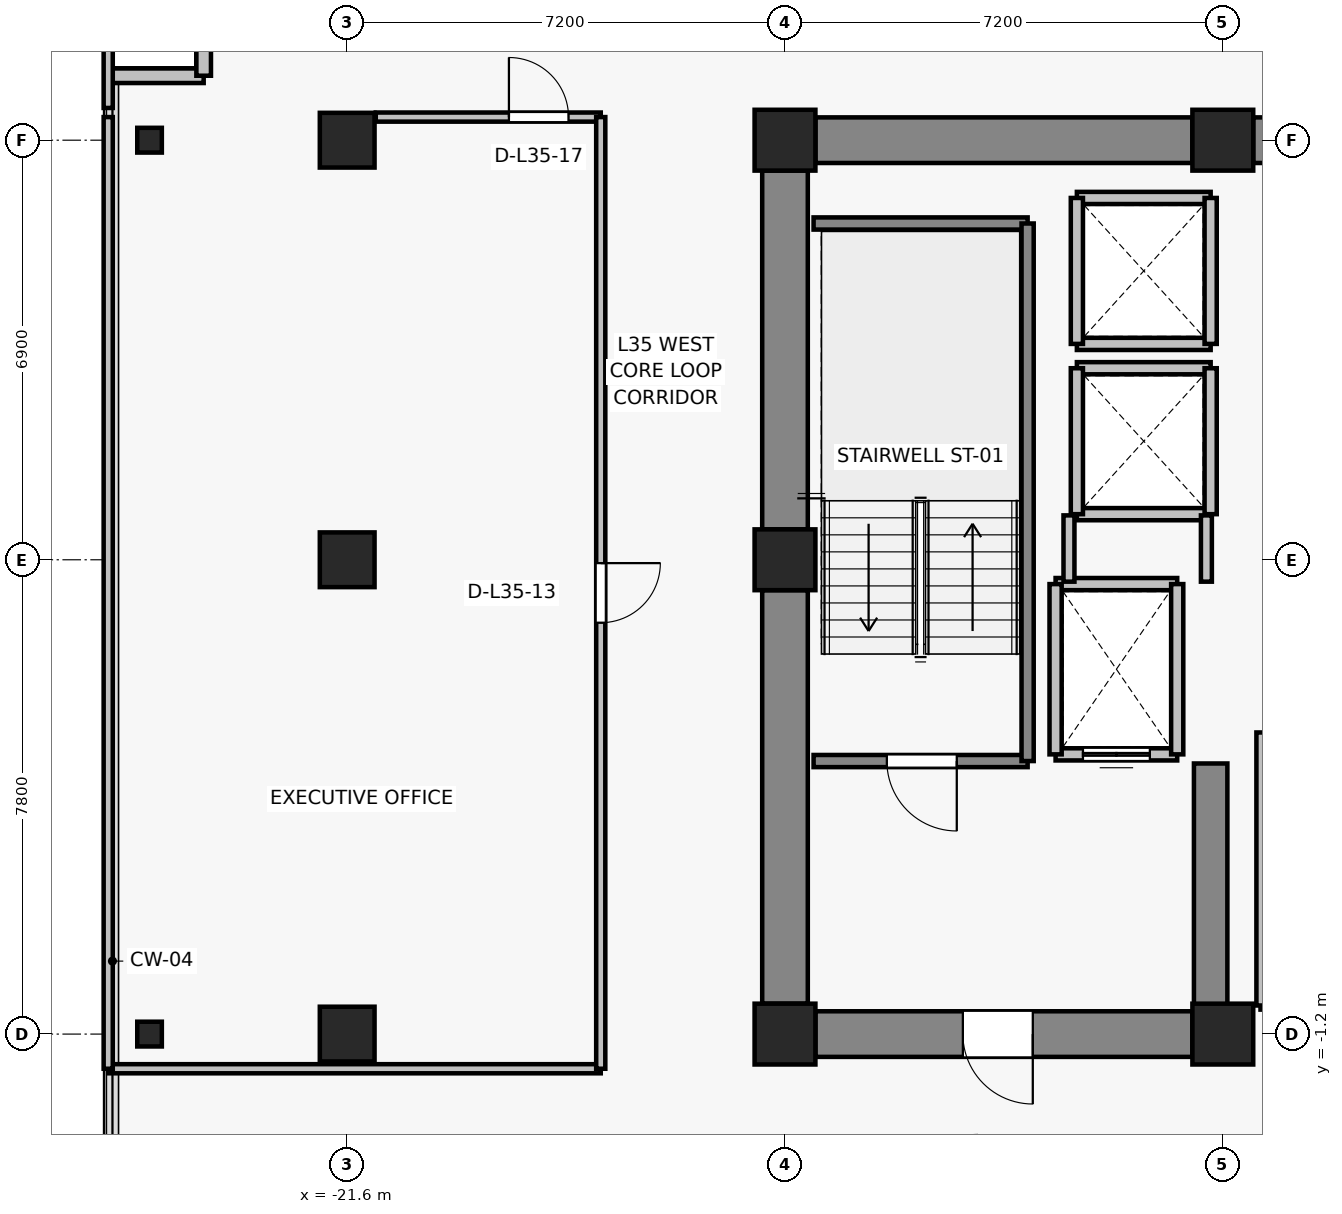
"""IFC4 building model, lengths in metres.
Left out: names, types, materials, properties, quantities, classifications, styles, units other than length and angle.
Written with IfcOpenShell. Run it as: python <this file> out.ifc"""

import sys

from ifc_helpers import new_model, si_unit, direction, frame, frame_2d, origin, origin_2d, place, context, subcontext, project, spatial, rectangle, i_section, extrude, source, transform, mapped, element, fill, save


model = new_model("IFC4")
c1 = context("Model", 3, precision=1e-05, world=origin(), true_north=direction((0.0, 1.0)))
c2 = subcontext(c1, "Body", "Model", "MODEL_VIEW")
j1 = project(units=[si_unit("LENGTHUNIT", "METRE"), si_unit("PLANEANGLEUNIT", "RADIAN")], contexts=[c1])
p1 = place(None, origin())
s1 = spatial("IfcSite", under=j1, at=p1, CompositionType="ELEMENT")
p2 = place(p1, origin())
s2 = spatial("IfcBuilding", under=s1, at=p2, CompositionType="ELEMENT")
p3 = place(p2, frame((0.0, 0.0, 126.4)))
s3 = spatial("IfcBuildingStorey", under=s2, at=p3, CompositionType="ELEMENT", Elevation=126.4)
for number, where, z_axis, x_axis in (
    (1, (-14.4, -1.2, 0.0), (0.0, 0.0, 1.0), (1.0, 0.0, 0.0)),
    (2, (-7.2, -1.2, 0.0), (0.0, 0.0, 1.0), (1.0, 0.0, 0.0)),
    (3, (-14.4, 6.6, 0.0), (0.0, 0.0, 1.0), (1.0, 0.0, 0.0)),
    (4, (-14.4, 13.5, 0.0), (0.0, 0.0, 1.0), (1.0, 0.0, 0.0)),
    (5, (-7.2, 13.5, 0.0), (0.0, 0.0, 1.0), (1.0, 0.0, 0.0)),
):
    element("IfcColumn", number, at=place(p3, frame(where, z_axis=z_axis, x_axis=x_axis)), inside=s3, PredefinedType="COLUMN", context=c2, shape_type="SweptSolid", body=[
        extrude(rectangle(XDim=1.0, YDim=1.0, at=origin_2d()), origin(), (0.0, 0.0, 1.0), 3.3),
    ])
for number, where, z_axis, x_axis in (
    (6, (-21.6, -1.2, 0.0), (0.0, 0.0, 1.0), (1.0, 0.0, 0.0)),
    (7, (-21.6, 6.6, 0.0), (0.0, 0.0, 1.0), (1.0, 0.0, 0.0)),
    (8, (-21.6, 13.5, 0.0), (0.0, 0.0, 1.0), (1.0, 0.0, 0.0)),
):
    element("IfcColumn", number, at=place(p3, frame(where, z_axis=z_axis, x_axis=x_axis)), inside=s3, PredefinedType="COLUMN", context=c2, shape_type="SweptSolid", body=[
        extrude(rectangle(XDim=0.9, YDim=0.9, at=origin_2d()), origin(), (0.0, 0.0, 1.0), 3.3),
    ])
for number, where, z_axis, x_axis in (
    (9, (-24.85, -1.2, 0.0), (0.0, 0.0, 1.0), (1.0, 0.0, 0.0)),
    (10, (-24.85, 13.5, 0.0), (0.0, 0.0, 1.0), (1.0, 0.0, 0.0)),
):
    element("IfcColumn", number, at=place(p3, frame(where, z_axis=z_axis, x_axis=x_axis)), inside=s3, PredefinedType="COLUMN", context=c2, shape_type="SweptSolid", body=[
        extrude(i_section(OverallWidth=0.404, OverallDepth=0.407, WebThickness=0.022, FlangeThickness=0.032, FilletRadius=0.015, at=origin_2d()), origin(), (0.0, 0.0, 1.0), 3.3),
    ])
p4 = place(p3, frame((-13.9, 13.5, 0.0), z_axis=(0.0, 0.0, 1.0), x_axis=(1.0, 0.0, 0.0)))
e11 = element("IfcWall", 11, at=p4, inside=s3, PredefinedType="SHEAR", context=c2, shape_type="SweptSolid", body=[
    extrude(rectangle(XDim=6.2, YDim=0.75, at=frame_2d((3.1, 0.0))), origin(), (0.0, 0.0, 1.0), 3.075),
])
p5 = place(p3, frame((-6.7, 13.5, 0.0), z_axis=(0.0, 0.0, 1.0), x_axis=(1.0, 0.0, 0.0)))
e12 = element("IfcWall", 12, at=p5, inside=s3, PredefinedType="SHEAR", context=c2, shape_type="SweptSolid", body=[
    extrude(rectangle(XDim=13.4, YDim=0.75, at=frame_2d((6.7, 0.0))), origin(), (0.0, 0.0, 1.0), 3.075),
])
p6 = place(p3, frame((-14.4, -0.7, 0.0), z_axis=(0.0, 0.0, 1.0), x_axis=(0.0, 1.0, 0.0)))
e13 = element("IfcWall", 13, at=p6, inside=s3, PredefinedType="SHEAR", context=c2, shape_type="SweptSolid", body=[
    extrude(rectangle(XDim=6.8, YDim=0.75, at=frame_2d((3.4, 0.0))), origin(), (0.0, 0.0, 1.0), 3.075),
])
p7 = place(p3, frame((-14.4, 7.1, 0.0), z_axis=(0.0, 0.0, 1.0), x_axis=(0.0, 1.0, 0.0)))
e14 = element("IfcWall", 14, at=p7, inside=s3, PredefinedType="SHEAR", context=c2, shape_type="SweptSolid", body=[
    extrude(rectangle(XDim=5.9, YDim=0.75, at=frame_2d((2.95, 0.0))), origin(), (0.0, 0.0, 1.0), 3.075),
])
p8 = place(p3, frame((-7.7, -1.2, 0.0), z_axis=(0.0, 0.0, 1.0), x_axis=(-1.0, 0.0, 0.0)))
e15 = element("IfcWall", 15, at=p8, inside=s3, PredefinedType="SHEAR", context=c2, shape_type="SweptSolid", body=[
    extrude(rectangle(XDim=6.2, YDim=0.75, at=frame_2d((3.1, 0.0))), origin(), (0.0, 0.0, 1.0), 3.075),
])
p9 = place(p8, frame((2.625, 0.0, 0.0)))
e16 = element("IfcOpeningElement", 16, at=p9, cuts=e15, PredefinedType="OPENING", context=c2, shape_type="SweptSolid", body=[
    extrude(rectangle(XDim=1.15, YDim=2.15, at=frame_2d((0.575, 1.075))), frame((0.0, 0.385, 0.0), z_axis=(0.0, -1.0, 0.0), x_axis=(1.0, 0.0, 0.0)), (0.0, 0.0, 1.0), 0.77),
])
p10 = place(p3, frame((-7.4, -0.825, 0.0), z_axis=(0.0, 0.0, 1.0), x_axis=(0.0, 1.0, 0.0)))
e17 = element("IfcWall", 17, at=p10, inside=s3, PredefinedType="SHEAR", context=c2, shape_type="SweptSolid", body=[
    extrude(rectangle(XDim=4.075, YDim=0.55, at=frame_2d((2.038, 0.0))), origin(), (0.0, 0.0, 1.0), 3.075),
])
for number, where, z_axis, x_axis in (
    (18, (-23.96, 14.56, 0.0), (0.0, 0.0, 1.0), (-1.0, 0.0, 0.0)),
    (19, (-23.96, 16.06, 0.0), (0.0, 0.0, 1.0), (0.0, -1.0, 0.0)),
):
    element("IfcWall", number, at=place(p3, frame(where, z_axis=z_axis, x_axis=x_axis)), inside=s3, PredefinedType="SOLIDWALL", context=c2, shape_type="SweptSolid", body=[
        extrude(rectangle(XDim=1.5, YDim=0.24, at=frame_2d((0.75, 0.0))), origin(), (0.0, 0.0, 1.0), 3.075),
    ])
p11 = place(p3, frame((-7.95, 3.4, 0.0), z_axis=(0.0, 0.0, 1.0), x_axis=(-1.0, 0.0, 0.0)))
e20 = element("IfcWall", 20, at=p11, inside=s3, PredefinedType="SOLIDWALL", context=c2, shape_type="SweptSolid", body=[
    extrude(rectangle(XDim=2.0, YDim=0.2, at=frame_2d((1.0, 0.0))), origin(), (0.0, 0.0, 1.0), 3.075),
])
p12 = place(p11, frame((0.45, 0.0, 0.0)))
e21 = element("IfcOpeningElement", 21, at=p12, cuts=e20, PredefinedType="OPENING", context=c2, shape_type="SweptSolid", body=[
    extrude(rectangle(XDim=1.1, YDim=2.2, at=frame_2d((0.55, 1.1))), frame((0.0, 0.11, 0.0), z_axis=(0.0, -1.0, 0.0), x_axis=(1.0, 0.0, 0.0)), (0.0, 0.0, 1.0), 0.22),
])
p13 = place(p3, frame((-9.95, 6.2, 0.0), z_axis=(0.0, 0.0, 1.0), x_axis=(1.0, 0.0, 0.0)))
e22 = element("IfcWall", 22, at=p13, inside=s3, PredefinedType="SOLIDWALL", context=c2, shape_type="SweptSolid", body=[
    extrude(rectangle(XDim=2.0, YDim=0.2, at=frame_2d((1.0, 0.0))), origin(), (0.0, 0.0, 1.0), 3.075),
])
for number, where, z_axis, x_axis in (
    (23, (-9.95, 3.4, 0.0), (0.0, 0.0, 1.0), (0.0, 1.0, 0.0)),
    (24, (-7.95, 6.2, 0.0), (0.0, 0.0, 1.0), (0.0, -1.0, 0.0)),
):
    element("IfcWall", number, at=place(p3, frame(where, z_axis=z_axis, x_axis=x_axis)), inside=s3, PredefinedType="SOLIDWALL", context=c2, shape_type="SweptSolid", body=[
        extrude(rectangle(XDim=2.8, YDim=0.2, at=frame_2d((1.4, 0.0))), origin(), (0.0, 0.0, 1.0), 3.075),
    ])
for number, where, z_axis, x_axis in (
    (25, (-7.4, 7.35, 0.0), (0.0, 0.0, 1.0), (-1.0, 0.0, 0.0)),
    (26, (-9.6, 9.75, 0.0), (0.0, 0.0, 1.0), (1.0, 0.0, 0.0)),
):
    element("IfcWall", number, at=place(p3, frame(where, z_axis=z_axis, x_axis=x_axis)), inside=s3, PredefinedType="SOLIDWALL", context=c2, shape_type="SweptSolid", body=[
        extrude(rectangle(XDim=2.2, YDim=0.2, at=frame_2d((1.1, 0.0))), origin(), (0.0, 0.0, 1.0), 2.515),
    ])
p14 = place(p3, frame((-9.6, 7.35, 0.0), z_axis=(0.0, 0.0, 1.0), x_axis=(0.0, 1.0, 0.0)))
e27 = element("IfcWall", 27, at=p14, inside=s3, PredefinedType="SOLIDWALL", context=c2, shape_type="SweptSolid", body=[
    extrude(rectangle(XDim=2.4, YDim=0.2, at=frame_2d((1.2, 0.0))), origin(), (0.0, 0.0, 1.0), 3.075),
])
p15 = place(p3, frame((-7.4, 9.75, 0.0), z_axis=(0.0, 0.0, 1.0), x_axis=(0.0, -1.0, 0.0)))
e28 = element("IfcWall", 28, at=p15, inside=s3, PredefinedType="SOLIDWALL", context=c2, shape_type="SweptSolid", body=[
    extrude(rectangle(XDim=2.4, YDim=0.2, at=frame_2d((1.2, 0.0))), origin(), (0.0, 0.0, 1.0), 2.515),
])
for number, where, z_axis, x_axis in (
    (29, (-7.4, 10.15, 0.0), (0.0, 0.0, 1.0), (-1.0, 0.0, 0.0)),
    (30, (-9.6, 12.55, 0.0), (0.0, 0.0, 1.0), (1.0, 0.0, 0.0)),
):
    element("IfcWall", number, at=place(p3, frame(where, z_axis=z_axis, x_axis=x_axis)), inside=s3, PredefinedType="SOLIDWALL", context=c2, shape_type="SweptSolid", body=[
        extrude(rectangle(XDim=2.2, YDim=0.2, at=frame_2d((1.1, 0.0))), origin(), (0.0, 0.0, 1.0), 2.515),
    ])
p16 = place(p3, frame((-9.6, 10.15, 0.0), z_axis=(0.0, 0.0, 1.0), x_axis=(0.0, 1.0, 0.0)))
e31 = element("IfcWall", 31, at=p16, inside=s3, PredefinedType="SOLIDWALL", context=c2, shape_type="SweptSolid", body=[
    extrude(rectangle(XDim=2.4, YDim=0.2, at=frame_2d((1.2, 0.0))), origin(), (0.0, 0.0, 1.0), 3.075),
])
p17 = place(p3, frame((-7.4, 12.55, 0.0), z_axis=(0.0, 0.0, 1.0), x_axis=(0.0, -1.0, 0.0)))
e32 = element("IfcWall", 32, at=p17, inside=s3, PredefinedType="SOLIDWALL", context=c2, shape_type="SweptSolid", body=[
    extrude(rectangle(XDim=2.4, YDim=0.2, at=frame_2d((1.2, 0.0))), origin(), (0.0, 0.0, 1.0), 2.515),
])
p18 = place(p3, frame((-10.41, 3.29, 0.0), z_axis=(0.0, 0.0, 1.0), x_axis=(-1.0, 0.0, 0.0)))
e33 = element("IfcWall", 33, at=p18, inside=s3, PredefinedType="SOLIDWALL", context=c2, shape_type="SweptSolid", body=[
    extrude(rectangle(XDim=3.52, YDim=0.2, at=frame_2d((1.76, 0.0))), origin(), (0.0, 0.0, 1.0), 3.075),
])
p19 = place(p18, frame((1.165, 0.0, 0.0)))
e34 = element("IfcOpeningElement", 34, at=p19, cuts=e33, PredefinedType="OPENING", context=c2, shape_type="SweptSolid", body=[
    extrude(rectangle(XDim=1.15, YDim=2.15, at=frame_2d((0.575, 1.075))), frame((0.0, 0.11, 0.0), z_axis=(0.0, -1.0, 0.0), x_axis=(1.0, 0.0, 0.0)), (0.0, 0.0, 1.0), 0.22),
])
p20 = place(p3, frame((-13.93, 12.13, 0.0), z_axis=(0.0, 0.0, 1.0), x_axis=(1.0, 0.0, 0.0)))
e35 = element("IfcWall", 35, at=p20, inside=s3, PredefinedType="SOLIDWALL", context=c2, shape_type="SweptSolid", body=[
    extrude(rectangle(XDim=3.52, YDim=0.2, at=frame_2d((1.76, 0.0))), origin(), (0.0, 0.0, 1.0), 3.075),
])
p21 = place(p3, frame((-10.41, 12.13, 0.0), z_axis=(0.0, 0.0, 1.0), x_axis=(0.0, -1.0, 0.0)))
e36 = element("IfcWall", 36, at=p21, inside=s3, PredefinedType="SOLIDWALL", context=c2, shape_type="SweptSolid", body=[
    extrude(rectangle(XDim=8.84, YDim=0.2, at=frame_2d((4.42, 0.0))), origin(), (0.0, 0.0, 1.0), 3.075),
])
p22 = place(p3, frame((-9.73, 6.24, 0.0), z_axis=(0.0, 0.0, 1.0), x_axis=(0.0, 1.0, 0.0)))
e37 = element("IfcWall", 37, at=p22, inside=s3, PredefinedType="PARTITIONING", context=c2, shape_type="SweptSolid", body=[
    extrude(rectangle(XDim=1.09, YDim=0.18, at=frame_2d((0.545, 0.0))), origin(), (0.0, 0.0, 1.0), 3.075),
])
p23 = place(p3, frame((-7.47, 7.33, 0.0), z_axis=(0.0, 0.0, 1.0), x_axis=(0.0, -1.0, 0.0)))
e38 = element("IfcWall", 38, at=p23, inside=s3, PredefinedType="PARTITIONING", context=c2, shape_type="SweptSolid", body=[
    extrude(rectangle(XDim=1.09, YDim=0.18, at=frame_2d((0.545, 0.0))), origin(), (0.0, 0.0, 1.0), 2.515),
])
p24 = place(p3, frame((-1.47, -0.73, 0.0), z_axis=(0.0, 0.0, 1.0), x_axis=(-1.0, 0.0, 0.0)))
e39 = element("IfcWall", 39, at=p24, inside=s3, PredefinedType="PARTITIONING", context=c2, shape_type="SweptSolid", body=[
    extrude(rectangle(XDim=5.11, YDim=0.135, at=frame_2d((2.555, 0.0))), origin(), (0.0, 0.0, 1.0), 3.075),
])
p25 = place(p3, frame((-6.58, -0.73, 0.0), z_axis=(0.0, 0.0, 1.0), x_axis=(0.0, 1.0, 0.0)))
e40 = element("IfcWall", 40, at=p25, inside=s3, PredefinedType="PARTITIONING", context=c2, shape_type="SweptSolid", body=[
    extrude(rectangle(XDim=4.49, YDim=0.135, at=frame_2d((2.245, 0.0))), origin(), (0.0, 0.0, 1.0), 3.075),
])
p26 = place(p3, frame((-17.43, -1.77, 0.0), z_axis=(0.0, 0.0, 1.0), x_axis=(-1.0, 0.0, 0.0)))
e41 = element("IfcWall", 41, at=p26, inside=s3, PredefinedType="PARTITIONING", context=c2, shape_type="SweptSolid", body=[
    extrude(rectangle(XDim=8.1, YDim=0.15, at=frame_2d((4.05, 0.0))), origin(), (0.0, 0.0, 1.0), 2.515),
])
p27 = place(p3, frame((-21.13, 13.88, 0.0), z_axis=(0.0, 0.0, 1.0), x_axis=(1.0, 0.0, 0.0)))
e42 = element("IfcWall", 42, at=p27, inside=s3, PredefinedType="PARTITIONING", context=c2, shape_type="SweptSolid", body=[
    extrude(rectangle(XDim=3.7, YDim=0.15, at=frame_2d((1.85, 0.0))), origin(), (0.0, 0.0, 1.0), 3.075),
])
p28 = place(p27, frame((2.19, 0.0, 0.0)))
e43 = element("IfcOpeningElement", 43, at=p28, cuts=e42, PredefinedType="OPENING", context=c2, shape_type="SweptSolid", body=[
    extrude(rectangle(XDim=0.98, YDim=2.15, at=frame_2d((0.49, 1.075))), frame((0.0, 0.085, 0.0), z_axis=(0.0, -1.0, 0.0), x_axis=(1.0, 0.0, 0.0)), (0.0, 0.0, 1.0), 0.17),
])
p29 = place(p3, frame((-25.53, -1.77, 0.0), z_axis=(0.0, 0.0, 1.0), x_axis=(0.0, 1.0, 0.0)))
e44 = element("IfcWall", 44, at=p29, inside=s3, PredefinedType="PARTITIONING", context=c2, shape_type="SweptSolid", body=[
    extrude(rectangle(XDim=15.65, YDim=0.15, at=frame_2d((7.825, 0.0))), origin(), (0.0, 0.0, 1.0), 3.075),
])
p30 = place(p3, frame((-17.43, 13.88, 0.0), z_axis=(0.0, 0.0, 1.0), x_axis=(0.0, -1.0, 0.0)))
e45 = element("IfcWall", 45, at=p30, inside=s3, PredefinedType="PARTITIONING", context=c2, shape_type="SweptSolid", body=[
    extrude(rectangle(XDim=15.65, YDim=0.15, at=frame_2d((7.825, 0.0))), origin(), (0.0, 0.0, 1.0), 2.515),
])
p31 = place(p30, frame((7.335, 0.0, 0.0)))
e46 = element("IfcOpeningElement", 46, at=p31, cuts=e45, PredefinedType="OPENING", context=c2, shape_type="SweptSolid", body=[
    extrude(rectangle(XDim=0.98, YDim=2.15, at=frame_2d((0.49, 1.075))), frame((0.0, 0.085, 0.0), z_axis=(0.0, -1.0, 0.0), x_axis=(1.0, 0.0, 0.0)), (0.0, 0.0, 1.0), 0.17),
])
p32 = place(p3, frame((-25.53, 14.03, 0.0), z_axis=(0.0, 0.0, 1.0), x_axis=(0.0, 1.0, 0.0)))
e47 = element("IfcWall", 47, at=p32, inside=s3, PredefinedType="PARTITIONING", context=c2, shape_type="SweptSolid", body=[
    extrude(rectangle(XDim=3.6, YDim=0.15, at=frame_2d((1.8, 0.0))), origin(), (0.0, 0.0, 1.0), 3.075),
])
m1 = source(origin(), c2, "Body", "SweptSolid", [
    extrude(rectangle(XDim=1.1, YDim=2.2, at=frame_2d((0.55, 1.1))), frame((0.0, 0.025, 0.0), z_axis=(0.0, -1.0, 0.0), x_axis=(1.0, 0.0, 0.0)), (0.0, 0.0, 1.0), 0.05),
])
p33 = place(p12, origin())
e48 = element("IfcDoor", 48, at=p33, inside=s3, OperationType="DOUBLE_DOOR_SLIDING", PredefinedType="DOOR", context=c2, shape_type="MappedRepresentation", body=[
    mapped(m1, transform((0.0, 0.0, 0.0), x_axis=(1.0, 0.0, 0.0), y_axis=(0.0, 1.0, 0.0), z_axis=(0.0, 0.0, 1.0), scale=1.0)),
])
fill(e21, e48)
m2 = source(origin(), c2, "Body", "SweptSolid", [
    extrude(rectangle(XDim=1.15, YDim=2.15, at=frame_2d((0.575, 1.075))), frame((0.0, 0.025, 0.0), z_axis=(0.0, -1.0, 0.0), x_axis=(1.0, 0.0, 0.0)), (0.0, 0.0, 1.0), 0.05),
])
p34 = place(p19, origin())
e49 = element("IfcDoor", 49, at=p34, inside=s3, OperationType="SINGLE_SWING_LEFT", PredefinedType="DOOR", context=c2, shape_type="MappedRepresentation", body=[
    mapped(m2, transform((0.0, 0.0, 0.0), x_axis=(1.0, 0.0, 0.0), y_axis=(0.0, 1.0, 0.0), z_axis=(0.0, 0.0, 1.0), scale=1.0)),
])
fill(e34, e49)
p35 = place(p9, origin())
e50 = element("IfcDoor", 50, at=p35, inside=s3, OperationType="SINGLE_SWING_LEFT", PredefinedType="DOOR", context=c2, shape_type="MappedRepresentation", body=[
    mapped(m2, transform((0.0, 0.0, 0.0), x_axis=(1.0, 0.0, 0.0), y_axis=(0.0, 1.0, 0.0), z_axis=(0.0, 0.0, 1.0), scale=1.0)),
])
fill(e16, e50)
m3 = source(origin(), c2, "Body", "SweptSolid", [
    extrude(rectangle(XDim=0.98, YDim=2.15, at=frame_2d((0.49, 1.075))), frame((0.0, 0.025, 0.0), z_axis=(0.0, -1.0, 0.0), x_axis=(1.0, 0.0, 0.0)), (0.0, 0.0, 1.0), 0.05),
])
p36 = place(p31, origin())
e51 = element("IfcDoor", 51, at=p36, inside=s3, OperationType="SINGLE_SWING_LEFT", PredefinedType="DOOR", context=c2, shape_type="MappedRepresentation", body=[
    mapped(m3, transform((0.0, 0.0, 0.0), x_axis=(1.0, 0.0, 0.0), y_axis=(0.0, 1.0, 0.0), z_axis=(0.0, 0.0, 1.0), scale=1.0)),
])
fill(e46, e51)
p37 = place(p28, origin())
e52 = element("IfcDoor", 52, at=p37, inside=s3, OperationType="SINGLE_SWING_LEFT", PredefinedType="DOOR", context=c2, shape_type="MappedRepresentation", body=[
    mapped(m3, transform((0.0, 0.0, 0.0), x_axis=(1.0, 0.0, 0.0), y_axis=(0.0, 1.0, 0.0), z_axis=(0.0, 0.0, 1.0), scale=1.0)),
])
fill(e43, e52)
save(model, sys.argv[1])
